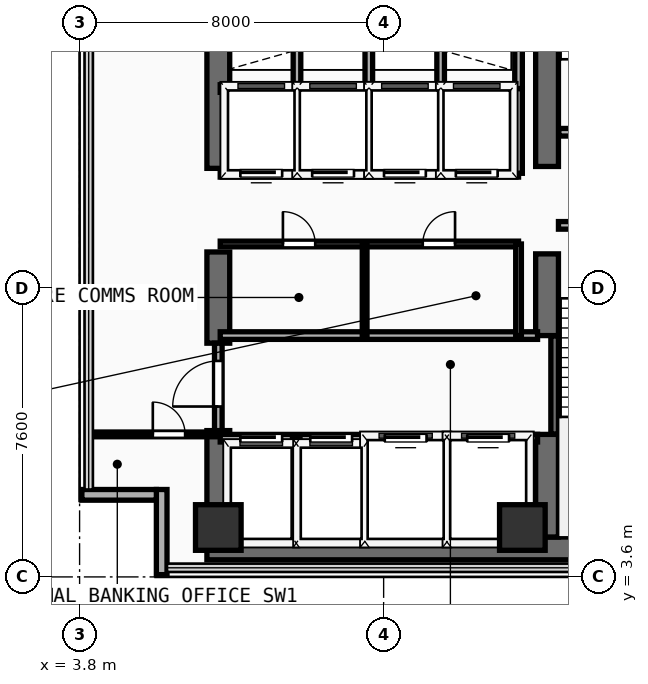
"""IFC4 building model, lengths in metres.
Left out: names, types, materials, properties, quantities, classifications, styles, units other than length and angle.
Written with IfcOpenShell. Run it as: python <this file> out.ifc"""

import sys

from ifc_helpers import new_model, si_unit, direction, frame, frame_2d, origin, origin_2d, place, context, subcontext, project, spatial, rectangle, extrude, element, fill, save


model = new_model("IFC4")
c1 = context("Model", 3, precision=1e-05, world=origin(), true_north=direction((0.0, 1.0)))
c2 = subcontext(c1, "Body", "Model", "MODEL_VIEW")
j1 = project(units=[si_unit("LENGTHUNIT", "METRE"), si_unit("PLANEANGLEUNIT", "RADIAN")], contexts=[c1])
p1 = place(None, origin())
s1 = spatial("IfcSite", under=j1, at=p1, CompositionType="ELEMENT")
p2 = place(p1, origin())
s2 = spatial("IfcBuilding", under=s1, at=p2, CompositionType="ELEMENT")
p3 = place(p2, frame((0.0, 0.0, 169.0)))
s3 = spatial("IfcBuildingStorey", under=s2, at=p3, CompositionType="ELEMENT", Elevation=169.0)
p4 = place(p3, frame((7.15, 4.35, 0.0), z_axis=(0.0, 0.0, 1.0), x_axis=(1.0, 0.0, 0.0)))
e1 = element("IfcWall", 1, at=p4, inside=s3, PredefinedType="SHEAR", context=c2, shape_type="SweptSolid", body=[
    extrude(rectangle(XDim=13.95, YDim=0.6, at=frame_2d((6.975, 0.0))), origin(), (0.0, 0.0, 1.0), 3.56),
])
p5 = place(p3, frame((7.45, 4.65, 0.0), z_axis=(0.0, 0.0, 1.0), x_axis=(0.0, 1.0, 0.0)))
e2 = element("IfcWall", 2, at=p5, inside=s3, PredefinedType="SHEAR", context=c2, shape_type="SweptSolid", body=[
    extrude(rectangle(XDim=2.8, YDim=0.6, at=frame_2d((1.4, 0.0))), origin(), (0.0, 0.0, 1.0), 3.56),
])
p6 = place(p3, frame((7.45, 9.75, 0.0), z_axis=(0.0, 0.0, 1.0), x_axis=(0.0, 1.0, 0.0)))
e3 = element("IfcWall", 3, at=p6, inside=s3, PredefinedType="SHEAR", context=c2, shape_type="SweptSolid", body=[
    extrude(rectangle(XDim=2.4, YDim=0.6, at=frame_2d((1.2, 0.0))), origin(), (0.0, 0.0, 1.0), 3.56),
])
p7 = place(p3, frame((7.45, 14.35, 0.0), z_axis=(0.0, 0.0, 1.0), x_axis=(0.0, 1.0, 0.0)))
e4 = element("IfcWall", 4, at=p7, inside=s3, PredefinedType="SHEAR", context=c2, shape_type="SweptSolid", body=[
    extrude(rectangle(XDim=4.81, YDim=0.6, at=frame_2d((2.405, 0.0))), origin(), (0.0, 0.0, 1.0), 3.56),
])
p8 = place(p3, frame((16.1, 4.65, 0.0), z_axis=(0.0, 0.0, 1.0), x_axis=(0.0, 1.0, 0.0)))
e5 = element("IfcWall", 5, at=p8, inside=s3, PredefinedType="SHEAR", context=c2, shape_type="SweptSolid", body=[
    extrude(rectangle(XDim=2.7, YDim=0.6, at=frame_2d((1.35, 0.0))), origin(), (0.0, 0.0, 1.0), 3.56),
])
p9 = place(p3, frame((16.1, 9.95, 0.0), z_axis=(0.0, 0.0, 1.0), x_axis=(0.0, 1.0, 0.0)))
e6 = element("IfcWall", 6, at=p9, inside=s3, PredefinedType="SHEAR", context=c2, shape_type="SweptSolid", body=[
    extrude(rectangle(XDim=2.15, YDim=0.6, at=frame_2d((1.075, 0.0))), origin(), (0.0, 0.0, 1.0), 3.56),
])
p10 = place(p3, frame((16.1, 14.4, 0.0), z_axis=(0.0, 0.0, 1.0), x_axis=(0.0, 1.0, 0.0)))
e7 = element("IfcWall", 7, at=p10, inside=s3, PredefinedType="SHEAR", context=c2, shape_type="SweptSolid", body=[
    extrude(rectangle(XDim=9.1, YDim=0.6, at=frame_2d((4.55, 0.0))), origin(), (0.0, 0.0, 1.0), 3.56),
])
for number, where, z_axis, x_axis in (
    (8, (7.45, 4.9, 0.0), (0.0, 0.0, 1.0), (1.0, 0.0, 0.0)),
    (9, (15.45, 4.9, 0.0), (0.0, 0.0, 1.0), (1.0, 0.0, 0.0)),
):
    element("IfcColumn", number, at=place(p3, frame(where, z_axis=z_axis, x_axis=x_axis)), inside=s3, PredefinedType="COLUMN", context=c2, shape_type="SweptSolid", body=[
        extrude(rectangle(XDim=1.2, YDim=1.2, at=origin_2d()), origin(), (0.0, 0.0, 1.0), 3.56),
    ])
p11 = place(p3, frame((5.96, 3.66, 0.0), z_axis=(0.0, 0.0, 1.0), x_axis=(0.0, 1.0, 0.0)))
e10 = element("IfcWall", 10, at=p11, inside=s3, PredefinedType="SOLIDWALL", context=c2, shape_type="SweptSolid", body=[
    extrude(rectangle(XDim=2.24, YDim=0.28, at=frame_2d((1.12, 0.0))), origin(), (0.0, 0.0, 1.0), 3.56),
])
p12 = place(p3, frame((3.86, 5.76, 0.0), z_axis=(0.0, 0.0, 1.0), x_axis=(1.0, 0.0, 0.0)))
e11 = element("IfcWall", 11, at=p12, inside=s3, PredefinedType="SOLIDWALL", context=c2, shape_type="SweptSolid", body=[
    extrude(rectangle(XDim=1.96, YDim=0.28, at=frame_2d((0.98, 0.0))), origin(), (0.0, 0.0, 1.0), 3.56),
])
p13 = place(p3, frame((16.3, 7.36, 0.0), z_axis=(0.0, 0.0, 1.0), x_axis=(0.0, 1.0, 0.0)))
e12 = element("IfcWall", 12, at=p13, inside=s3, PredefinedType="SHEAR", context=c2, shape_type="SweptSolid", body=[
    extrude(rectangle(XDim=2.58, YDim=0.2, at=frame_2d((1.29, 0.0))), origin(), (0.0, 0.0, 1.0), 3.56),
])
p14 = place(p3, frame((16.4, 12.85, 0.0), z_axis=(0.0, 0.0, 1.0), x_axis=(1.0, 0.0, 0.0)))
e13 = element("IfcWall", 13, at=p14, inside=s3, PredefinedType="PARTITIONING", context=c2, shape_type="SweptSolid", body=[
    extrude(rectangle(XDim=3.96, YDim=0.2, at=frame_2d((1.98, 0.0))), origin(), (0.0, 0.0, 1.0), 3.56),
])
p15 = place(p14, frame((1.304, 0.0, 0.0)))
e14 = element("IfcOpeningElement", 14, at=p15, cuts=e13, PredefinedType="OPENING", context=c2, shape_type="SweptSolid", body=[
    extrude(rectangle(XDim=1.1, YDim=2.2, at=frame_2d((0.55, 1.1))), frame((0.0, 0.11, 0.0), z_axis=(0.0, -1.0, 0.0), x_axis=(1.0, 0.0, 0.0)), (0.0, 0.0, 1.0), 0.22),
])
p16 = place(p3, frame((16.41, 15.3, 0.0), z_axis=(0.0, 0.0, 1.0), x_axis=(1.0, 0.0, 0.0)))
e15 = element("IfcWall", 15, at=p16, inside=s3, PredefinedType="PARTITIONING", context=c2, shape_type="SweptSolid", body=[
    extrude(rectangle(XDim=3.95, YDim=0.2, at=frame_2d((1.975, 0.0))), origin(), (0.0, 0.0, 1.0), 3.56),
])
p17 = place(p16, frame((1.294, 0.0, 0.0)))
e16 = element("IfcOpeningElement", 16, at=p17, cuts=e15, PredefinedType="OPENING", context=c2, shape_type="SweptSolid", body=[
    extrude(rectangle(XDim=1.1, YDim=2.2, at=frame_2d((0.55, 1.1))), frame((0.0, 0.11, 0.0), z_axis=(0.0, -1.0, 0.0), x_axis=(1.0, 0.0, 0.0)), (0.0, 0.0, 1.0), 0.22),
])
p18 = place(p3, frame((7.5, 7.25, 0.0), z_axis=(0.0, 0.0, 1.0), x_axis=(1.0, 0.0, 0.0)))
e17 = element("IfcWall", 17, at=p18, inside=s3, PredefinedType="PARTITIONING", context=c2, shape_type="SweptSolid", body=[
    extrude(rectangle(XDim=8.35, YDim=0.2, at=frame_2d((4.175, 0.0))), origin(), (0.0, 0.0, 1.0), 3.56),
])
p19 = place(p18, frame((0.53, 0.0, 0.0)))
e18 = element("IfcOpeningElement", 18, at=p19, cuts=e17, PredefinedType="OPENING", context=c2, shape_type="SweptSolid", body=[
    extrude(rectangle(XDim=1.1, YDim=2.2, at=frame_2d((0.55, 1.1))), frame((0.0, 0.11, 0.0), z_axis=(0.0, -1.0, 0.0), x_axis=(1.0, 0.0, 0.0)), (0.0, 0.0, 1.0), 0.22),
])
p20 = place(p18, frame((2.37, 0.0, 0.0)))
e19 = element("IfcOpeningElement", 19, at=p20, cuts=e17, PredefinedType="OPENING", context=c2, shape_type="SweptSolid", body=[
    extrude(rectangle(XDim=1.1, YDim=2.2, at=frame_2d((0.55, 1.1))), frame((0.0, 0.11, 0.0), z_axis=(0.0, -1.0, 0.0), x_axis=(1.0, 0.0, 0.0)), (0.0, 0.0, 1.0), 0.22),
])
p21 = place(p18, frame((4.33, 0.0, 0.0)))
e20 = element("IfcOpeningElement", 20, at=p21, cuts=e17, PredefinedType="OPENING", context=c2, shape_type="SweptSolid", body=[
    extrude(rectangle(XDim=1.1, YDim=2.2, at=frame_2d((0.55, 1.1))), frame((0.0, 0.11, 0.0), z_axis=(0.0, -1.0, 0.0), x_axis=(1.0, 0.0, 0.0)), (0.0, 0.0, 1.0), 0.22),
])
p22 = place(p18, frame((6.5, 0.0, 0.0)))
e21 = element("IfcOpeningElement", 21, at=p22, cuts=e17, PredefinedType="OPENING", context=c2, shape_type="SweptSolid", body=[
    extrude(rectangle(XDim=1.1, YDim=2.2, at=frame_2d((0.55, 1.1))), frame((0.0, 0.11, 0.0), z_axis=(0.0, -1.0, 0.0), x_axis=(1.0, 0.0, 0.0)), (0.0, 0.0, 1.0), 0.22),
])
p23 = place(p3, frame((7.5, 9.95, 0.0), z_axis=(0.0, 0.0, 1.0), x_axis=(1.0, 0.0, 0.0)))
e22 = element("IfcWall", 22, at=p23, inside=s3, PredefinedType="PARTITIONING", context=c2, shape_type="SweptSolid", body=[
    extrude(rectangle(XDim=8.35, YDim=0.2, at=frame_2d((4.175, 0.0))), origin(), (0.0, 0.0, 1.0), 3.56),
])
for number, where, z_axis, x_axis in (
    (23, (9.5, 4.45, 0.0), (0.0, 0.0, 1.0), (0.0, 1.0, 0.0)),
    (24, (11.36, 4.45, 0.0), (0.0, 0.0, 1.0), (0.0, 1.0, 0.0)),
    (25, (13.46, 4.45, 0.0), (0.0, 0.0, 1.0), (0.0, 1.0, 0.0)),
):
    element("IfcWall", number, at=place(p3, frame(where, z_axis=z_axis, x_axis=x_axis)), inside=s3, PredefinedType="PARTITIONING", context=c2, shape_type="SweptSolid", body=[
        extrude(rectangle(XDim=2.8, YDim=0.2, at=frame_2d((1.4, 0.0))), origin(), (0.0, 0.0, 1.0), 3.56),
    ])
p24 = place(p3, frame((7.45, 7.45, 0.0), z_axis=(0.0, 0.0, 1.0), x_axis=(0.0, 1.0, 0.0)))
e26 = element("IfcWall", 26, at=p24, inside=s3, PredefinedType="PARTITIONING", context=c2, shape_type="SweptSolid", body=[
    extrude(rectangle(XDim=2.3, YDim=0.2, at=frame_2d((1.15, 0.0))), origin(), (0.0, 0.0, 1.0), 2.54),
])
p25 = place(p24, frame((0.633, 0.0, 0.0)))
e27 = element("IfcOpeningElement", 27, at=p25, cuts=e26, PredefinedType="OPENING", context=c2, shape_type="SweptSolid", body=[
    extrude(rectangle(XDim=1.2, YDim=2.25, at=frame_2d((0.6, 1.125))), frame((0.0, 0.11, 0.0), z_axis=(0.0, -1.0, 0.0), x_axis=(1.0, 0.0, 0.0)), (0.0, 0.0, 1.0), 0.22),
])
p26 = place(p3, frame((7.5, 12.36, 0.0), z_axis=(0.0, 0.0, 1.0), x_axis=(1.0, 0.0, 0.0)))
e28 = element("IfcWall", 28, at=p26, inside=s3, PredefinedType="PARTITIONING", context=c2, shape_type="SweptSolid", body=[
    extrude(rectangle(XDim=7.85, YDim=0.15, at=frame_2d((3.925, 0.0))), origin(), (0.0, 0.0, 1.0), 3.56),
])
p27 = place(p26, frame((1.65, 0.0, 0.0)))
e29 = element("IfcOpeningElement", 29, at=p27, cuts=e28, PredefinedType="OPENING", context=c2, shape_type="SweptSolid", body=[
    extrude(rectangle(XDim=0.85, YDim=2.15, at=frame_2d((0.425, 1.075))), frame((0.0, 0.085, 0.0), z_axis=(0.0, -1.0, 0.0), x_axis=(1.0, 0.0, 0.0)), (0.0, 0.0, 1.0), 0.17),
])
p28 = place(p26, frame((5.329, 0.0, 0.0)))
e30 = element("IfcOpeningElement", 30, at=p28, cuts=e28, PredefinedType="OPENING", context=c2, shape_type="SweptSolid", body=[
    extrude(rectangle(XDim=0.85, YDim=2.15, at=frame_2d((0.425, 1.075))), frame((0.0, 0.085, 0.0), z_axis=(0.0, -1.0, 0.0), x_axis=(1.0, 0.0, 0.0)), (0.0, 0.0, 1.0), 0.17),
])
p29 = place(p3, frame((15.35, 9.95, 0.0), z_axis=(0.0, 0.0, 1.0), x_axis=(0.0, 1.0, 0.0)))
e31 = element("IfcWall", 31, at=p29, inside=s3, PredefinedType="PARTITIONING", context=c2, shape_type="SweptSolid", body=[
    extrude(rectangle(XDim=2.41, YDim=0.15, at=frame_2d((1.205, 0.0))), origin(), (0.0, 0.0, 1.0), 3.56),
])
p30 = place(p3, frame((11.3, 9.95, 0.0), z_axis=(0.0, 0.0, 1.0), x_axis=(0.0, 1.0, 0.0)))
e32 = element("IfcWall", 32, at=p30, inside=s3, PredefinedType="PARTITIONING", context=c2, shape_type="SweptSolid", body=[
    extrude(rectangle(XDim=2.41, YDim=0.125, at=frame_2d((1.205, 0.0))), origin(), (0.0, 0.0, 1.0), 3.56),
])
p31 = place(p3, frame((7.5, 14.22, 0.0), z_axis=(0.0, 0.0, 1.0), x_axis=(1.0, 0.0, 0.0)))
e33 = element("IfcWall", 33, at=p31, inside=s3, PredefinedType="PARTITIONING", context=c2, shape_type="SweptSolid", body=[
    extrude(rectangle(XDim=7.85, YDim=0.2, at=frame_2d((3.925, 0.0))), origin(), (0.0, 0.0, 1.0), 3.56),
])
p32 = place(p31, frame((0.53, 0.0, 0.0)))
e34 = element("IfcOpeningElement", 34, at=p32, cuts=e33, PredefinedType="OPENING", context=c2, shape_type="SweptSolid", body=[
    extrude(rectangle(XDim=1.1, YDim=2.2, at=frame_2d((0.55, 1.1))), frame((0.0, 0.11, 0.0), z_axis=(0.0, -1.0, 0.0), x_axis=(1.0, 0.0, 0.0)), (0.0, 0.0, 1.0), 0.22),
])
p33 = place(p31, frame((2.42, 0.0, 0.0)))
e35 = element("IfcOpeningElement", 35, at=p33, cuts=e33, PredefinedType="OPENING", context=c2, shape_type="SweptSolid", body=[
    extrude(rectangle(XDim=1.1, YDim=2.2, at=frame_2d((0.55, 1.1))), frame((0.0, 0.11, 0.0), z_axis=(0.0, -1.0, 0.0), x_axis=(1.0, 0.0, 0.0)), (0.0, 0.0, 1.0), 0.22),
])
p34 = place(p31, frame((4.31, 0.0, 0.0)))
e36 = element("IfcOpeningElement", 36, at=p34, cuts=e33, PredefinedType="OPENING", context=c2, shape_type="SweptSolid", body=[
    extrude(rectangle(XDim=1.1, YDim=2.2, at=frame_2d((0.55, 1.1))), frame((0.0, 0.11, 0.0), z_axis=(0.0, -1.0, 0.0), x_axis=(1.0, 0.0, 0.0)), (0.0, 0.0, 1.0), 0.22),
])
p35 = place(p31, frame((6.2, 0.0, 0.0)))
e37 = element("IfcOpeningElement", 37, at=p35, cuts=e33, PredefinedType="OPENING", context=c2, shape_type="SweptSolid", body=[
    extrude(rectangle(XDim=1.1, YDim=2.2, at=frame_2d((0.55, 1.1))), frame((0.0, 0.11, 0.0), z_axis=(0.0, -1.0, 0.0), x_axis=(1.0, 0.0, 0.0)), (0.0, 0.0, 1.0), 0.22),
])
p36 = place(p3, frame((7.5, 16.45, 0.0), z_axis=(0.0, 0.0, 1.0), x_axis=(1.0, 0.0, 0.0)))
e38 = element("IfcWall", 38, at=p36, inside=s3, PredefinedType="PARTITIONING", context=c2, shape_type="SweptSolid", body=[
    extrude(rectangle(XDim=7.85, YDim=0.2, at=frame_2d((3.925, 0.0))), origin(), (0.0, 0.0, 1.0), 3.56),
])
for number, where, z_axis, x_axis in (
    (39, (15.35, 14.22, 0.0), (0.0, 0.0, 1.0), (0.0, 1.0, 0.0)),
    (40, (9.52, 14.22, 0.0), (0.0, 0.0, 1.0), (0.0, 1.0, 0.0)),
    (41, (11.41, 14.22, 0.0), (0.0, 0.0, 1.0), (0.0, 1.0, 0.0)),
    (42, (13.3, 14.22, 0.0), (0.0, 0.0, 1.0), (0.0, 1.0, 0.0)),
):
    element("IfcWall", number, at=place(p3, frame(where, z_axis=z_axis, x_axis=x_axis)), inside=s3, PredefinedType="PARTITIONING", context=c2, shape_type="SweptSolid", body=[
        extrude(rectangle(XDim=2.23, YDim=0.2, at=frame_2d((1.115, 0.0))), origin(), (0.0, 0.0, 1.0), 3.56),
    ])
for number, where, z_axis, x_axis in (
    (43, (15.35, 16.45, 0.0), (0.0, 0.0, 1.0), (0.0, 1.0, 0.0)),
    (44, (9.52, 16.45, 0.0), (0.0, 0.0, 1.0), (0.0, 1.0, 0.0)),
    (45, (11.41, 16.45, 0.0), (0.0, 0.0, 1.0), (0.0, 1.0, 0.0)),
    (46, (13.3, 16.45, 0.0), (0.0, 0.0, 1.0), (0.0, 1.0, 0.0)),
):
    element("IfcWall", number, at=place(p3, frame(where, z_axis=z_axis, x_axis=x_axis)), inside=s3, PredefinedType="PARTITIONING", context=c2, shape_type="SweptSolid", body=[
        extrude(rectangle(XDim=2.67, YDim=0.2, at=frame_2d((1.335, 0.0))), origin(), (0.0, 0.0, 1.0), 3.56),
    ])
p37 = place(p3, frame((4.04, 7.35, 0.0), z_axis=(0.0, 0.0, 1.0), x_axis=(1.0, 0.0, 0.0)))
e47 = element("IfcWall", 47, at=p37, inside=s3, PredefinedType="PARTITIONING", context=c2, shape_type="SweptSolid", body=[
    extrude(rectangle(XDim=3.36, YDim=0.125, at=frame_2d((1.68, 0.0))), origin(), (0.0, 0.0, 1.0), 3.56),
])
p38 = place(p37, frame((1.687, 0.0, 0.0)))
e48 = element("IfcOpeningElement", 48, at=p38, cuts=e47, PredefinedType="OPENING", context=c2, shape_type="SweptSolid", body=[
    extrude(rectangle(XDim=0.85, YDim=2.15, at=frame_2d((0.425, 1.075))), frame((0.0, 0.073, 0.0), z_axis=(0.0, -1.0, 0.0), x_axis=(1.0, 0.0, 0.0)), (0.0, 0.0, 1.0), 0.145),
])
p39 = place(p19, origin())
e49 = element("IfcDoor", 49, at=p39, inside=s3, OperationType="SLIDING_TO_LEFT", PredefinedType="DOOR", context=c2, shape_type="SweptSolid", body=[
    extrude(rectangle(XDim=1.1, YDim=2.2, at=frame_2d((0.55, 1.1))), frame((0.0, 0.025, 0.0), z_axis=(0.0, -1.0, 0.0), x_axis=(1.0, 0.0, 0.0)), (0.0, 0.0, 1.0), 0.05),
])
fill(e18, e49)
p40 = place(p20, origin())
e50 = element("IfcDoor", 50, at=p40, inside=s3, OperationType="SLIDING_TO_LEFT", PredefinedType="DOOR", context=c2, shape_type="SweptSolid", body=[
    extrude(rectangle(XDim=1.1, YDim=2.2, at=frame_2d((0.55, 1.1))), frame((0.0, 0.025, 0.0), z_axis=(0.0, -1.0, 0.0), x_axis=(1.0, 0.0, 0.0)), (0.0, 0.0, 1.0), 0.05),
])
fill(e19, e50)
p41 = place(p21, origin())
e51 = element("IfcDoor", 51, at=p41, inside=s3, OperationType="SLIDING_TO_LEFT", PredefinedType="DOOR", context=c2, shape_type="SweptSolid", body=[
    extrude(rectangle(XDim=1.1, YDim=2.2, at=frame_2d((0.55, 1.1))), frame((0.0, 0.025, 0.0), z_axis=(0.0, -1.0, 0.0), x_axis=(1.0, 0.0, 0.0)), (0.0, 0.0, 1.0), 0.05),
])
fill(e20, e51)
p42 = place(p22, origin())
e52 = element("IfcDoor", 52, at=p42, inside=s3, OperationType="SLIDING_TO_LEFT", PredefinedType="DOOR", context=c2, shape_type="SweptSolid", body=[
    extrude(rectangle(XDim=1.1, YDim=2.2, at=frame_2d((0.55, 1.1))), frame((0.0, 0.025, 0.0), z_axis=(0.0, -1.0, 0.0), x_axis=(1.0, 0.0, 0.0)), (0.0, 0.0, 1.0), 0.05),
])
fill(e21, e52)
p43 = place(p25, frame((1.2, 0.0, 0.0), z_axis=(0.0, 0.0, 1.0), x_axis=(-1.0, 0.0, 0.0)))
e53 = element("IfcDoor", 53, at=p43, inside=s3, OperationType="SINGLE_SWING_RIGHT", PredefinedType="DOOR", context=c2, shape_type="SweptSolid", body=[
    extrude(rectangle(XDim=1.2, YDim=2.25, at=frame_2d((0.6, 1.125))), frame((0.0, 0.025, 0.0), z_axis=(0.0, -1.0, 0.0), x_axis=(1.0, 0.0, 0.0)), (0.0, 0.0, 1.0), 0.05),
])
fill(e27, e53)
p44 = place(p27, origin())
e54 = element("IfcDoor", 54, at=p44, inside=s3, OperationType="SINGLE_SWING_LEFT", PredefinedType="DOOR", context=c2, shape_type="SweptSolid", body=[
    extrude(rectangle(XDim=0.85, YDim=2.15, at=frame_2d((0.425, 1.075))), frame((0.0, 0.025, 0.0), z_axis=(0.0, -1.0, 0.0), x_axis=(1.0, 0.0, 0.0)), (0.0, 0.0, 1.0), 0.05),
])
fill(e29, e54)
p45 = place(p28, origin())
e55 = element("IfcDoor", 55, at=p45, inside=s3, OperationType="SINGLE_SWING_RIGHT", PredefinedType="DOOR", context=c2, shape_type="SweptSolid", body=[
    extrude(rectangle(XDim=0.85, YDim=2.15, at=frame_2d((0.425, 1.075))), frame((0.0, 0.025, 0.0), z_axis=(0.0, -1.0, 0.0), x_axis=(1.0, 0.0, 0.0)), (0.0, 0.0, 1.0), 0.05),
])
fill(e30, e55)
p46 = place(p32, frame((1.1, 0.0, 0.0), z_axis=(0.0, 0.0, 1.0), x_axis=(-1.0, 0.0, 0.0)))
e56 = element("IfcDoor", 56, at=p46, inside=s3, OperationType="SLIDING_TO_LEFT", PredefinedType="DOOR", context=c2, shape_type="SweptSolid", body=[
    extrude(rectangle(XDim=1.1, YDim=2.2, at=frame_2d((0.55, 1.1))), frame((0.0, 0.025, 0.0), z_axis=(0.0, -1.0, 0.0), x_axis=(1.0, 0.0, 0.0)), (0.0, 0.0, 1.0), 0.05),
])
fill(e34, e56)
p47 = place(p33, frame((1.1, 0.0, 0.0), z_axis=(0.0, 0.0, 1.0), x_axis=(-1.0, 0.0, 0.0)))
e57 = element("IfcDoor", 57, at=p47, inside=s3, OperationType="SLIDING_TO_LEFT", PredefinedType="DOOR", context=c2, shape_type="SweptSolid", body=[
    extrude(rectangle(XDim=1.1, YDim=2.2, at=frame_2d((0.55, 1.1))), frame((0.0, 0.025, 0.0), z_axis=(0.0, -1.0, 0.0), x_axis=(1.0, 0.0, 0.0)), (0.0, 0.0, 1.0), 0.05),
])
fill(e35, e57)
p48 = place(p34, frame((1.1, 0.0, 0.0), z_axis=(0.0, 0.0, 1.0), x_axis=(-1.0, 0.0, 0.0)))
e58 = element("IfcDoor", 58, at=p48, inside=s3, OperationType="SLIDING_TO_LEFT", PredefinedType="DOOR", context=c2, shape_type="SweptSolid", body=[
    extrude(rectangle(XDim=1.1, YDim=2.2, at=frame_2d((0.55, 1.1))), frame((0.0, 0.025, 0.0), z_axis=(0.0, -1.0, 0.0), x_axis=(1.0, 0.0, 0.0)), (0.0, 0.0, 1.0), 0.05),
])
fill(e36, e58)
p49 = place(p35, frame((1.1, 0.0, 0.0), z_axis=(0.0, 0.0, 1.0), x_axis=(-1.0, 0.0, 0.0)))
e59 = element("IfcDoor", 59, at=p49, inside=s3, OperationType="SLIDING_TO_LEFT", PredefinedType="DOOR", context=c2, shape_type="SweptSolid", body=[
    extrude(rectangle(XDim=1.1, YDim=2.2, at=frame_2d((0.55, 1.1))), frame((0.0, 0.025, 0.0), z_axis=(0.0, -1.0, 0.0), x_axis=(1.0, 0.0, 0.0)), (0.0, 0.0, 1.0), 0.05),
])
fill(e37, e59)
p50 = place(p38, origin())
e60 = element("IfcDoor", 60, at=p50, inside=s3, OperationType="SINGLE_SWING_LEFT", PredefinedType="DOOR", context=c2, shape_type="SweptSolid", body=[
    extrude(rectangle(XDim=0.85, YDim=2.15, at=frame_2d((0.425, 1.075))), frame((0.0, 0.025, 0.0), z_axis=(0.0, -1.0, 0.0), x_axis=(1.0, 0.0, 0.0)), (0.0, 0.0, 1.0), 0.05),
])
fill(e48, e60)
save(model, sys.argv[1])
